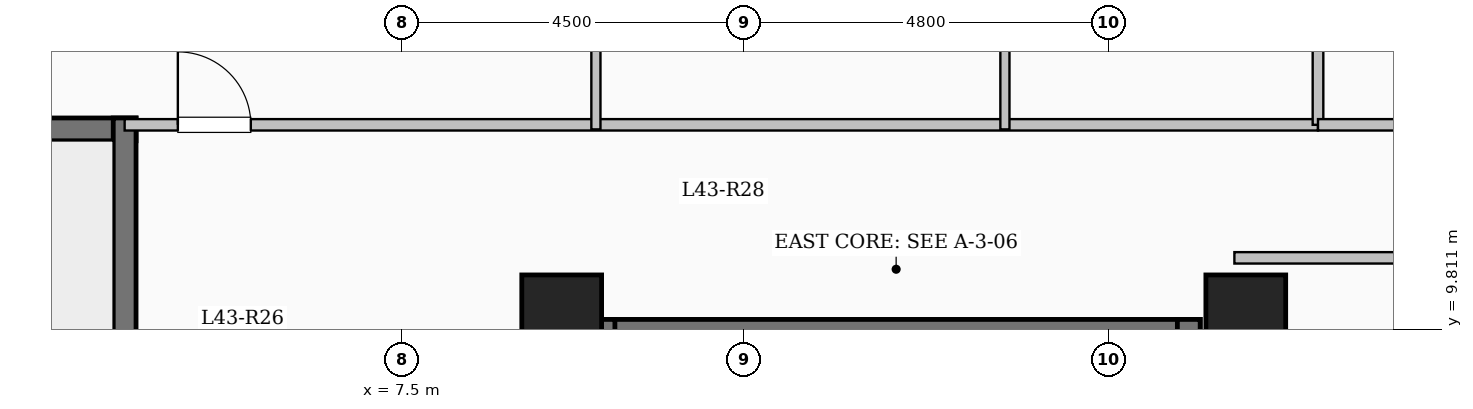
"""IFC4 building model, lengths in metres.
Left out: names, types, materials, properties, quantities, classifications, styles, units other than length and angle.
Written with IfcOpenShell. Run it as: python <this file> out.ifc"""

import sys

from ifc_helpers import new_model, si_unit, direction, frame, frame_2d, origin, origin_2d, place, context, subcontext, project, spatial, rectangle, extrude, element, fill, save


model = new_model("IFC4")
c1 = context("Model", 3, precision=1e-05, world=origin(), true_north=direction((0.0, 1.0)))
c2 = subcontext(c1, "Body", "Model", "MODEL_VIEW")
j1 = project(units=[si_unit("LENGTHUNIT", "METRE"), si_unit("PLANEANGLEUNIT", "RADIAN")], contexts=[c1])
p1 = place(None, origin())
s1 = spatial("IfcSite", under=j1, at=p1, CompositionType="ELEMENT")
p2 = place(p1, origin())
s2 = spatial("IfcBuilding", under=s1, at=p2, CompositionType="ELEMENT")
p3 = place(p2, frame((0.0, 0.0, 159.4)))
s3 = spatial("IfcBuildingStorey", under=s2, at=p3, CompositionType="ELEMENT", Elevation=159.4)
for number, where, z_axis, x_axis in (
    (1, (9.6, 10.0, 0.0), (0.0, 0.0, 1.0), (1.0, 0.0, 0.0)),
    (2, (18.6, 10.0, 0.0), (0.0, 0.0, 1.0), (1.0, 0.0, 0.0)),
):
    element("IfcColumn", number, at=place(p3, frame(where, z_axis=z_axis, x_axis=x_axis)), inside=s3, PredefinedType="COLUMN", context=c2, shape_type="SweptSolid", body=[
        extrude(rectangle(XDim=1.05, YDim=1.05, at=origin_2d()), origin(), (0.0, 0.0, 1.0), 3.35),
    ])
p4 = place(p3, frame((10.0, 9.79, 0.0), z_axis=(0.0, 0.0, 1.0), x_axis=(1.0, 0.0, 0.0)))
e3 = element("IfcWall", 3, at=p4, inside=s3, PredefinedType="SHEAR", context=c2, shape_type="SweptSolid", body=[
    extrude(rectangle(XDim=8.0, YDim=0.3, at=frame_2d((4.0, 0.0))), origin(), (0.0, 0.0, 1.0), 3.35),
])
for number, where, z_axis, x_axis in (
    (4, (10.15, 6.35, 0.0), (0.0, 0.0, 1.0), (0.0, 1.0, 0.0)),
    (5, (17.85, 6.35, 0.0), (0.0, 0.0, 1.0), (0.0, 1.0, 0.0)),
):
    element("IfcWall", number, at=place(p3, frame(where, z_axis=z_axis, x_axis=x_axis)), inside=s3, PredefinedType="SHEAR", context=c2, shape_type="SweptSolid", body=[
        extrude(rectangle(XDim=3.59, YDim=0.3, at=frame_2d((1.795, 0.0))), origin(), (0.0, 0.0, 1.0), 3.35),
    ])
p5 = place(p3, frame((-4.0, 12.44, 0.0), z_axis=(0.0, 0.0, 1.0), x_axis=(1.0, 0.0, 0.0)))
e6 = element("IfcWall", 6, at=p5, inside=s3, PredefinedType="SHEAR", context=c2, shape_type="SweptSolid", body=[
    extrude(rectangle(XDim=8.0, YDim=0.3, at=frame_2d((4.0, 0.0))), origin(), (0.0, 0.0, 1.0), 3.35),
])
p6 = place(p3, frame((3.85, 9.0, 0.0), z_axis=(0.0, 0.0, 1.0), x_axis=(0.0, 1.0, 0.0)))
e7 = element("IfcWall", 7, at=p6, inside=s3, PredefinedType="SHEAR", context=c2, shape_type="SweptSolid", body=[
    extrude(rectangle(XDim=3.59, YDim=0.3, at=frame_2d((1.795, 0.0))), origin(), (0.0, 0.0, 1.0), 3.35),
])
p7 = place(p3, frame((3.85, 12.5, 0.0), z_axis=(0.0, 0.0, 1.0), x_axis=(1.0, 0.0, 0.0)))
e8 = element("IfcWall", 8, at=p7, inside=s3, PredefinedType="PARTITIONING", context=c2, shape_type="SweptSolid", body=[
    extrude(rectangle(XDim=15.7, YDim=0.15, at=frame_2d((7.85, 0.0))), origin(), (0.0, 0.0, 1.0), 3.1),
])
p8 = place(p7, frame((0.7, 0.0, 0.0)))
e9 = element("IfcOpeningElement", 9, at=p8, cuts=e8, PredefinedType="OPENING", context=c2, shape_type="SweptSolid", body=[
    extrude(rectangle(XDim=0.96, YDim=2.15, at=frame_2d((0.48, 1.075))), frame((0.0, 0.085, 0.0), z_axis=(0.0, -1.0, 0.0), x_axis=(1.0, 0.0, 0.0)), (0.0, 0.0, 1.0), 0.17),
])
p9 = place(p3, frame((10.05, 12.44, 0.0), z_axis=(0.0, 0.0, 1.0), x_axis=(0.0, 1.0, 0.0)))
e10 = element("IfcWall", 10, at=p9, inside=s3, PredefinedType="PARTITIONING", context=c2, shape_type="SweptSolid", body=[
    extrude(rectangle(XDim=8.994, YDim=0.12, at=frame_2d((4.497, 0.0))), origin(), (0.0, 0.0, 1.0), 3.1),
])
p10 = place(p9, frame((3.075, 0.0, 0.0)))
e11 = element("IfcOpeningElement", 11, at=p10, cuts=e10, PredefinedType="OPENING", context=c2, shape_type="SweptSolid", body=[
    extrude(rectangle(XDim=1.08, YDim=2.15, at=frame_2d((0.54, 1.075))), frame((0.0, 0.07, 0.0), z_axis=(0.0, -1.0, 0.0), x_axis=(1.0, 0.0, 0.0)), (0.0, 0.0, 1.0), 0.14),
])
p11 = place(p3, frame((15.431, 12.44, 0.0), z_axis=(0.0, 0.0, 1.0), x_axis=(0.0, 1.0, 0.0)))
e12 = element("IfcWall", 12, at=p11, inside=s3, PredefinedType="PARTITIONING", context=c2, shape_type="SweptSolid", body=[
    extrude(rectangle(XDim=2.79, YDim=0.12, at=frame_2d((1.395, 0.0))), origin(), (0.0, 0.0, 1.0), 3.1),
])
p12 = place(p3, frame((18.45, 10.75, 0.0), z_axis=(0.0, 0.0, 1.0), x_axis=(1.0, 0.0, 0.0)))
e13 = element("IfcWall", 13, at=p12, inside=s3, PredefinedType="PARTITIONING", context=c2, shape_type="SweptSolid", body=[
    extrude(rectangle(XDim=6.63, YDim=0.15, at=frame_2d((3.315, 0.0))), origin(), (0.0, 0.0, 1.0), 3.1),
])
p13 = place(p3, frame((19.55, 12.5, 0.0), z_axis=(0.0, 0.0, 1.0), x_axis=(0.0, 1.0, 0.0)))
e14 = element("IfcWall", 14, at=p13, inside=s3, PredefinedType="PARTITIONING", context=c2, shape_type="SweptSolid", body=[
    extrude(rectangle(XDim=4.75, YDim=0.14, at=frame_2d((2.375, 0.0))), origin(), (0.0, 0.0, 1.0), 3.1),
])
p14 = place(p3, frame((19.55, 12.5, 0.0), z_axis=(0.0, 0.0, 1.0), x_axis=(1.0, 0.0, 0.0)))
e15 = element("IfcWall", 15, at=p14, inside=s3, PredefinedType="PARTITIONING", context=c2, shape_type="SweptSolid", body=[
    extrude(rectangle(XDim=5.53, YDim=0.15, at=frame_2d((2.765, 0.0))), origin(), (0.0, 0.0, 1.0), 3.1),
])
p15 = place(p14, frame((2.29, 0.0, 0.0)))
e16 = element("IfcOpeningElement", 16, at=p15, cuts=e15, PredefinedType="OPENING", context=c2, shape_type="SweptSolid", body=[
    extrude(rectangle(XDim=0.95, YDim=2.15, at=frame_2d((0.475, 1.075))), frame((0.0, 0.085, 0.0), z_axis=(0.0, -1.0, 0.0), x_axis=(1.0, 0.0, 0.0)), (0.0, 0.0, 1.0), 0.17),
])
p16 = place(p8, origin())
e17 = element("IfcDoor", 17, at=p16, inside=s3, OperationType="SINGLE_SWING_LEFT", PredefinedType="DOOR", context=c2, shape_type="SweptSolid", body=[
    extrude(rectangle(XDim=0.96, YDim=2.15, at=frame_2d((0.48, 1.075))), frame((0.0, 0.025, 0.0), z_axis=(0.0, -1.0, 0.0), x_axis=(1.0, 0.0, 0.0)), (0.0, 0.0, 1.0), 0.05),
])
fill(e9, e17)
save(model, sys.argv[1])
